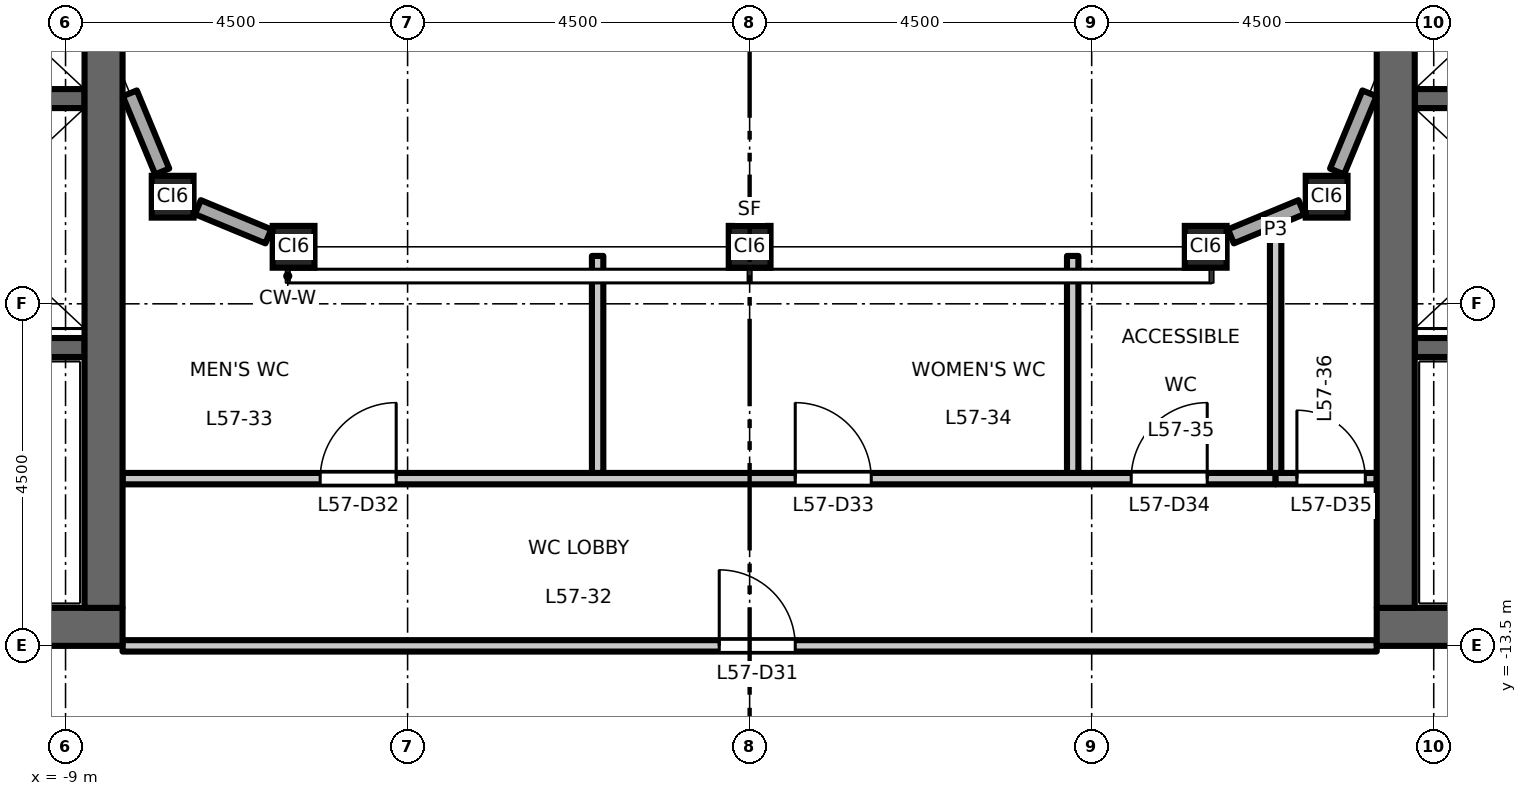
"""IFC4 building model, lengths in metres.
Left out: names, types, materials, properties, quantities, classifications, styles, units other than length and angle.
Written with IfcOpenShell. Run it as: python <this file> out.ifc"""

import sys

from ifc_helpers import new_model, si_unit, direction, frame, frame_2d, origin, origin_2d, place, context, subcontext, project, spatial, rectangle, hollow_rectangle, extrude, element, fill, save


model = new_model("IFC4")
c1 = context("Model", 3, precision=1e-05, world=origin(), true_north=direction((0.0, 1.0)))
c2 = subcontext(c1, "Body", "Model", "MODEL_VIEW")
j1 = project(units=[si_unit("LENGTHUNIT", "METRE"), si_unit("PLANEANGLEUNIT", "RADIAN")], contexts=[c1])
p1 = place(None, origin())
s1 = spatial("IfcSite", under=j1, at=p1, CompositionType="ELEMENT")
p2 = place(p1, origin())
s2 = spatial("IfcBuilding", under=s1, at=p2, CompositionType="ELEMENT")
p3 = place(p2, frame((0.0, 0.0, 264.7)))
s3 = spatial("IfcBuildingStorey", under=s2, at=p3, CompositionType="ELEMENT", Elevation=264.7)
for number, where, z_axis, x_axis in (
    (1, (-7.591, -7.591, 0.0), (0.0, 0.0, 1.0), (1.0, 0.0, 0.0)),
    (2, (-6.0, -8.25, 0.0), (0.0, 0.0, 1.0), (1.0, 0.0, 0.0)),
    (3, (0.0, -8.25, 0.0), (0.0, 0.0, 1.0), (1.0, 0.0, 0.0)),
    (4, (6.0, -8.25, 0.0), (0.0, 0.0, 1.0), (1.0, 0.0, 0.0)),
    (5, (7.591, -7.591, 0.0), (0.0, 0.0, 1.0), (1.0, 0.0, 0.0)),
):
    element("IfcColumn", number, at=place(p3, frame(where, z_axis=z_axis, x_axis=x_axis)), inside=s3, PredefinedType="COLUMN", context=c2, shape_type="SweptSolid", body=[
        extrude(hollow_rectangle(XDim=0.55, YDim=0.55, WallThickness=0.028, at=origin_2d()), origin(), (0.0, 0.0, 1.0), 4.5),
    ])
p4 = place(p3, frame((-8.75, -6.3, 0.0), z_axis=(0.0, 0.0, 1.0), x_axis=(-1.0, 0.0, 0.0)))
e6 = element("IfcWall", 6, at=p4, inside=s3, PredefinedType="SHEAR", context=c2, shape_type="SweptSolid", body=[
    extrude(rectangle(XDim=3.1, YDim=0.25, at=frame_2d((1.55, 0.0))), origin(), (0.0, 0.0, 1.0), 4.35),
])
p5 = place(p3, frame((-8.75, -9.575, 0.0), z_axis=(0.0, 0.0, 1.0), x_axis=(-1.0, 0.0, 0.0)))
e7 = element("IfcWall", 7, at=p5, inside=s3, PredefinedType="SHEAR", context=c2, shape_type="SweptSolid", body=[
    extrude(rectangle(XDim=8.0, YDim=0.25, at=frame_2d((4.0, 0.0))), origin(), (0.0, 0.0, 1.0), 4.35),
])
p6 = place(p5, frame((6.65, 0.0, 0.0)))
e8 = element("IfcOpeningElement", 8, at=p6, cuts=e7, PredefinedType="OPENING", context=c2, shape_type="SweptSolid", body=[
    extrude(rectangle(XDim=1.1, YDim=2.1, at=frame_2d((0.55, 1.05))), frame((0.0, 0.135, 0.0), z_axis=(0.0, -1.0, 0.0), x_axis=(1.0, 0.0, 0.0)), (0.0, 0.0, 1.0), 0.27),
])
p7 = place(p3, frame((-8.25, -13.25, 0.0), z_axis=(0.0, 0.0, 1.0), x_axis=(-1.0, 0.0, 0.0)))
e9 = element("IfcWall", 9, at=p7, inside=s3, PredefinedType="SHEAR", context=c2, shape_type="SweptSolid", body=[
    extrude(rectangle(XDim=13.5, YDim=0.5, at=frame_2d((6.75, 0.0))), origin(), (0.0, 0.0, 1.0), 4.35),
])
p8 = place(p3, frame((-8.5, -13.0, 0.0), z_axis=(0.0, 0.0, 1.0), x_axis=(0.0, 1.0, 0.0)))
e10 = element("IfcWall", 10, at=p8, inside=s3, PredefinedType="SHEAR", context=c2, shape_type="SweptSolid", body=[
    extrude(rectangle(XDim=26.0, YDim=0.5, at=frame_2d((13.0, 0.0))), origin(), (0.0, 0.0, 1.0), 4.35),
])
p9 = place(p3, frame((8.75, -6.3, 0.0), z_axis=(0.0, 0.0, 1.0), x_axis=(1.0, 0.0, 0.0)))
e11 = element("IfcWall", 11, at=p9, inside=s3, PredefinedType="SHEAR", context=c2, shape_type="SweptSolid", body=[
    extrude(rectangle(XDim=3.1, YDim=0.25, at=frame_2d((1.55, 0.0))), origin(), (0.0, 0.0, 1.0), 4.35),
])
p10 = place(p3, frame((8.75, -9.575, 0.0), z_axis=(0.0, 0.0, 1.0), x_axis=(1.0, 0.0, 0.0)))
e12 = element("IfcWall", 12, at=p10, inside=s3, PredefinedType="SHEAR", context=c2, shape_type="SweptSolid", body=[
    extrude(rectangle(XDim=8.0, YDim=0.25, at=frame_2d((4.0, 0.0))), origin(), (0.0, 0.0, 1.0), 4.35),
])
p11 = place(p10, frame((6.65, 0.0, 0.0)))
e13 = element("IfcOpeningElement", 13, at=p11, cuts=e12, PredefinedType="OPENING", context=c2, shape_type="SweptSolid", body=[
    extrude(rectangle(XDim=1.1, YDim=2.1, at=frame_2d((0.55, 1.05))), frame((0.0, 0.135, 0.0), z_axis=(0.0, -1.0, 0.0), x_axis=(1.0, 0.0, 0.0)), (0.0, 0.0, 1.0), 0.27),
])
p12 = place(p3, frame((8.25, -13.25, 0.0), z_axis=(0.0, 0.0, 1.0), x_axis=(1.0, 0.0, 0.0)))
e14 = element("IfcWall", 14, at=p12, inside=s3, PredefinedType="SHEAR", context=c2, shape_type="SweptSolid", body=[
    extrude(rectangle(XDim=13.5, YDim=0.5, at=frame_2d((6.75, 0.0))), origin(), (0.0, 0.0, 1.0), 4.35),
])
p13 = place(p3, frame((8.5, -13.0, 0.0), z_axis=(0.0, 0.0, 1.0), x_axis=(0.0, 1.0, 0.0)))
e15 = element("IfcWall", 15, at=p13, inside=s3, PredefinedType="SHEAR", context=c2, shape_type="SweptSolid", body=[
    extrude(rectangle(XDim=26.0, YDim=0.5, at=frame_2d((13.0, 0.0))), origin(), (0.0, 0.0, 1.0), 4.35),
])
p14 = place(p3, frame((6.332, -8.113, 0.0), z_axis=(0.0, 0.0, 1.0), x_axis=(0.923859650767, 0.382731427616, 0.0)))
e16 = element("IfcWall", 16, at=p14, inside=s3, PredefinedType="STANDARD", context=c2, shape_type="SweptSolid", body=[
    extrude(rectangle(XDim=1.003, YDim=0.2, at=frame_2d((0.502, 0.0))), origin(), (0.0, 0.0, 1.0), 3.918),
])
for number, where, z_axis, x_axis in (
    (17, (7.729, -7.259, 0.0), (0.0, 0.0, 1.0), (0.383, 0.924, 0.0)),
    (18, (-8.154, -6.231, 0.0), (0.0, 0.0, 1.0), (0.383, -0.924, 0.0)),
):
    element("IfcWall", number, at=place(p3, frame(where, z_axis=z_axis, x_axis=x_axis)), inside=s3, PredefinedType="STANDARD", context=c2, shape_type="SweptSolid", body=[
        extrude(rectangle(XDim=1.113, YDim=0.2, at=frame_2d((0.556, 0.0))), origin(), (0.0, 0.0, 1.0), 3.918),
    ])
p15 = place(p3, frame((-7.259, -7.729, 0.0), z_axis=(0.0, 0.0, 1.0), x_axis=(0.923859650767, -0.382731427616, 0.0)))
e19 = element("IfcWall", 19, at=p15, inside=s3, PredefinedType="STANDARD", context=c2, shape_type="SweptSolid", body=[
    extrude(rectangle(XDim=1.003, YDim=0.2, at=frame_2d((0.502, 0.0))), origin(), (0.0, 0.0, 1.0), 3.918),
])
p16 = place(p3, frame((-8.25, -13.5, 0.0), z_axis=(0.0, 0.0, 1.0), x_axis=(1.0, 0.0, 0.0)))
e20 = element("IfcWall", 20, at=p16, inside=s3, PredefinedType="PARTITIONING", context=c2, shape_type="SweptSolid", body=[
    extrude(rectangle(XDim=16.5, YDim=0.15, at=frame_2d((8.25, 0.0))), origin(), (0.0, 0.0, 1.0), 3.95),
])
p17 = place(p16, frame((7.85, 0.0, 0.0)))
e21 = element("IfcOpeningElement", 21, at=p17, cuts=e20, PredefinedType="OPENING", context=c2, shape_type="SweptSolid", body=[
    extrude(rectangle(XDim=1.0, YDim=2.1, at=frame_2d((0.5, 1.05))), frame((0.0, 0.085, 0.0), z_axis=(0.0, -1.0, 0.0), x_axis=(1.0, 0.0, 0.0)), (0.0, 0.0, 1.0), 0.17),
])
p18 = place(p3, frame((-8.25, -11.3, 0.0), z_axis=(0.0, 0.0, 1.0), x_axis=(1.0, 0.0, 0.0)))
e22 = element("IfcWall", 22, at=p18, inside=s3, PredefinedType="PARTITIONING", context=c2, shape_type="SweptSolid", body=[
    extrude(rectangle(XDim=15.17, YDim=0.15, at=frame_2d((7.585, 0.0))), origin(), (0.0, 0.0, 1.0), 4.35),
])
p19 = place(p18, frame((2.6, 0.0, 0.0)))
e23 = element("IfcOpeningElement", 23, at=p19, cuts=e22, PredefinedType="OPENING", context=c2, shape_type="SweptSolid", body=[
    extrude(rectangle(XDim=1.0, YDim=2.1, at=frame_2d((0.5, 1.05))), frame((0.0, 0.085, 0.0), z_axis=(0.0, -1.0, 0.0), x_axis=(1.0, 0.0, 0.0)), (0.0, 0.0, 1.0), 0.17),
])
p20 = place(p18, frame((8.85, 0.0, 0.0)))
e24 = element("IfcOpeningElement", 24, at=p20, cuts=e22, PredefinedType="OPENING", context=c2, shape_type="SweptSolid", body=[
    extrude(rectangle(XDim=1.0, YDim=2.1, at=frame_2d((0.5, 1.05))), frame((0.0, 0.085, 0.0), z_axis=(0.0, -1.0, 0.0), x_axis=(1.0, 0.0, 0.0)), (0.0, 0.0, 1.0), 0.17),
])
p21 = place(p18, frame((13.27, 0.0, 0.0)))
e25 = element("IfcOpeningElement", 25, at=p21, cuts=e22, PredefinedType="OPENING", context=c2, shape_type="SweptSolid", body=[
    extrude(rectangle(XDim=1.0, YDim=2.1, at=frame_2d((0.5, 1.05))), frame((0.0, 0.085, 0.0), z_axis=(0.0, -1.0, 0.0), x_axis=(1.0, 0.0, 0.0)), (0.0, 0.0, 1.0), 0.17),
])
p22 = place(p3, frame((6.92, -11.3, 0.0), z_axis=(0.0, 0.0, 1.0), x_axis=(1.0, 0.0, 0.0)))
e26 = element("IfcWall", 26, at=p22, inside=s3, PredefinedType="PARTITIONING", context=c2, shape_type="SweptSolid", body=[
    extrude(rectangle(XDim=1.33, YDim=0.15, at=frame_2d((0.665, 0.0))), origin(), (0.0, 0.0, 1.0), 4.35),
])
p23 = place(p22, frame((0.28, 0.0, 0.0)))
e27 = element("IfcOpeningElement", 27, at=p23, cuts=e26, PredefinedType="OPENING", context=c2, shape_type="SweptSolid", body=[
    extrude(rectangle(XDim=0.9, YDim=2.1, at=frame_2d((0.45, 1.05))), frame((0.0, 0.085, 0.0), z_axis=(0.0, -1.0, 0.0), x_axis=(1.0, 0.0, 0.0)), (0.0, 0.0, 1.0), 0.17),
])
for number, where, z_axis, x_axis in (
    (28, (-2.0, -11.225, 0.0), (0.0, 0.0, 1.0), (0.0, 1.0, 0.0)),
    (29, (4.25, -11.225, 0.0), (0.0, 0.0, 1.0), (0.0, 1.0, 0.0)),
):
    element("IfcWall", number, at=place(p3, frame(where, z_axis=z_axis, x_axis=x_axis)), inside=s3, PredefinedType="PARTITIONING", context=c2, shape_type="SweptSolid", body=[
        extrude(rectangle(XDim=2.855, YDim=0.15, at=frame_2d((1.427, 0.0))), origin(), (0.0, 0.0, 1.0), 4.35),
    ])
p24 = place(p3, frame((6.92, -11.225, 0.0), z_axis=(0.0, 0.0, 1.0), x_axis=(0.0, 1.0, 0.0)))
e30 = element("IfcWall", 30, at=p24, inside=s3, PredefinedType="PARTITIONING", context=c2, shape_type="SweptSolid", body=[
    extrude(rectangle(XDim=3.196, YDim=0.15, at=frame_2d((1.598, 0.0))), origin(), (0.0, 0.0, 1.0), 4.35),
])
p25 = place(p17, origin())
e31 = element("IfcDoor", 31, at=p25, inside=s3, OperationType="SINGLE_SWING_LEFT", PredefinedType="DOOR", context=c2, shape_type="SweptSolid", body=[
    extrude(rectangle(XDim=1.0, YDim=2.1, at=frame_2d((0.5, 1.05))), frame((0.0, 0.025, 0.0), z_axis=(0.0, -1.0, 0.0), x_axis=(1.0, 0.0, 0.0)), (0.0, 0.0, 1.0), 0.05),
])
fill(e21, e31)
p26 = place(p19, origin())
e32 = element("IfcDoor", 32, at=p26, inside=s3, OperationType="SINGLE_SWING_RIGHT", PredefinedType="DOOR", context=c2, shape_type="SweptSolid", body=[
    extrude(rectangle(XDim=1.0, YDim=2.1, at=frame_2d((0.5, 1.05))), frame((0.0, 0.025, 0.0), z_axis=(0.0, -1.0, 0.0), x_axis=(1.0, 0.0, 0.0)), (0.0, 0.0, 1.0), 0.05),
])
fill(e23, e32)
p27 = place(p20, origin())
e33 = element("IfcDoor", 33, at=p27, inside=s3, OperationType="SINGLE_SWING_LEFT", PredefinedType="DOOR", context=c2, shape_type="SweptSolid", body=[
    extrude(rectangle(XDim=1.0, YDim=2.1, at=frame_2d((0.5, 1.05))), frame((0.0, 0.025, 0.0), z_axis=(0.0, -1.0, 0.0), x_axis=(1.0, 0.0, 0.0)), (0.0, 0.0, 1.0), 0.05),
])
fill(e24, e33)
p28 = place(p21, origin())
e34 = element("IfcDoor", 34, at=p28, inside=s3, OperationType="SINGLE_SWING_RIGHT", PredefinedType="DOOR", context=c2, shape_type="SweptSolid", body=[
    extrude(rectangle(XDim=1.0, YDim=2.1, at=frame_2d((0.5, 1.05))), frame((0.0, 0.025, 0.0), z_axis=(0.0, -1.0, 0.0), x_axis=(1.0, 0.0, 0.0)), (0.0, 0.0, 1.0), 0.05),
])
fill(e25, e34)
p29 = place(p23, origin())
e35 = element("IfcDoor", 35, at=p29, inside=s3, OperationType="SINGLE_SWING_LEFT", PredefinedType="DOOR", context=c2, shape_type="SweptSolid", body=[
    extrude(rectangle(XDim=0.9, YDim=2.1, at=frame_2d((0.45, 1.05))), frame((0.0, 0.025, 0.0), z_axis=(0.0, -1.0, 0.0), x_axis=(1.0, 0.0, 0.0)), (0.0, 0.0, 1.0), 0.05),
])
fill(e27, e35)
save(model, sys.argv[1])
